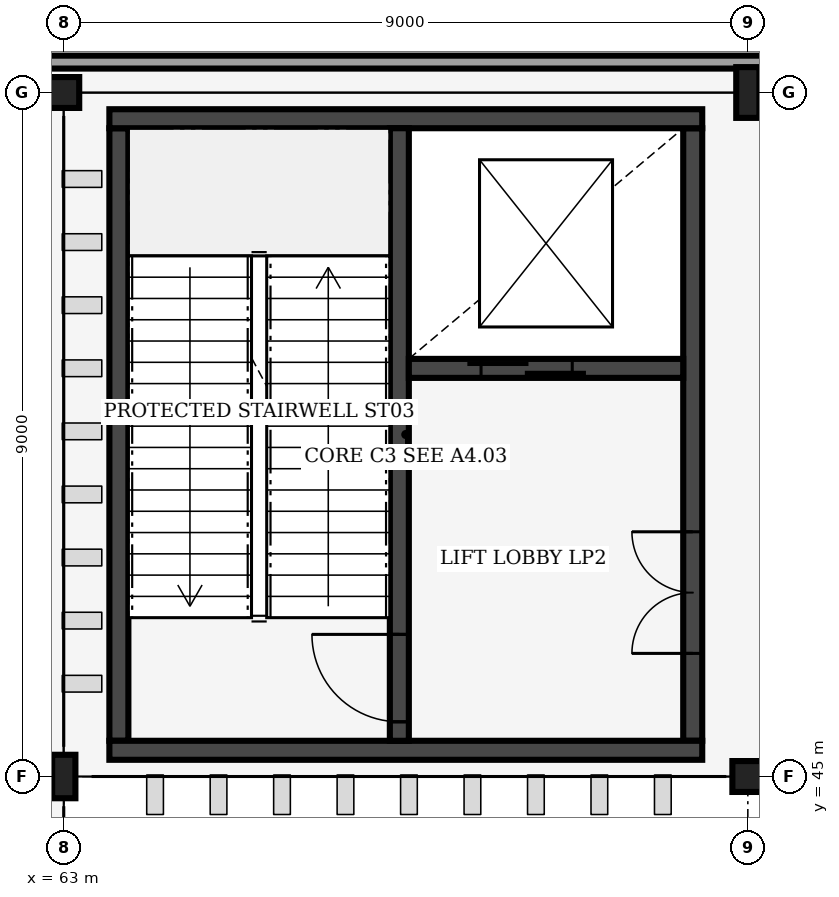
"""IFC4 building model, lengths in metres.
Left out: names, types, materials, properties, quantities, classifications, styles, units other than length and angle.
Written with IfcOpenShell. Run it as: python <this file> out.ifc"""

import sys

from ifc_helpers import new_model, si_unit, direction, frame, frame_2d, origin, origin_2d, place, context, subcontext, project, spatial, rectangle, hollow_circle, i_section, extrude, element, fill, save


model = new_model("IFC4")
c1 = context("Model", 3, precision=1e-05, world=origin(), true_north=direction((0.0, 1.0)))
c2 = subcontext(c1, "Body", "Model", "MODEL_VIEW")
j1 = project(units=[si_unit("LENGTHUNIT", "METRE"), si_unit("PLANEANGLEUNIT", "RADIAN")], contexts=[c1])
p1 = place(None, origin())
s1 = spatial("IfcSite", under=j1, at=p1, CompositionType="ELEMENT")
p2 = place(p1, origin())
s2 = spatial("IfcBuilding", under=s1, at=p2, CompositionType="ELEMENT")
p3 = place(p2, frame((0.0, 0.0, 12.0)))
s3 = spatial("IfcBuildingStorey", under=s2, at=p3, CompositionType="ELEMENT", Elevation=12.0)
p4 = place(p3, frame((63.0, 45.0, 0.0), z_axis=(0.0, 0.0, 1.0), x_axis=(1.0, 0.0, 0.0)))
e1 = element("IfcColumn", 1, at=p4, inside=s3, PredefinedType="COLUMN", context=c2, shape_type="SweptSolid", body=[
    extrude(i_section(OverallWidth=0.306, OverallDepth=0.572, WebThickness=0.021, FlangeThickness=0.04, FilletRadius=0.027, at=origin_2d()), origin(), (0.0, 0.0, 1.0), 6.0),
])
for number, where, z_axis, x_axis in (
    (2, (63.0, 54.0, 0.0), (0.0, 0.0, 1.0), (1.0, 0.0, 0.0)),
    (3, (72.0, 45.0, 0.0), (0.0, 0.0, 1.0), (1.0, 0.0, 0.0)),
):
    element("IfcColumn", number, at=place(p3, frame(where, z_axis=z_axis, x_axis=x_axis)), inside=s3, PredefinedType="COLUMN", context=c2, shape_type="SweptSolid", body=[
        extrude(hollow_circle(Radius=0.203, WallThickness=0.016, at=origin_2d()), origin(), (0.0, 0.0, 1.0), 6.0),
    ])
p5 = place(p3, frame((72.0, 54.0, 0.0), z_axis=(0.0, 0.0, 1.0), x_axis=(1.0, 0.0, 0.0)))
e4 = element("IfcColumn", 4, at=p5, inside=s3, PredefinedType="COLUMN", context=c2, shape_type="SweptSolid", body=[
    extrude(i_section(OverallWidth=0.305, OverallDepth=0.668, WebThickness=0.021, FlangeThickness=0.04, FilletRadius=0.027, at=origin_2d()), origin(), (0.0, 0.0, 1.0), 6.0),
])
p6 = place(p3, frame((63.725, 45.47, 0.0), z_axis=(0.0, 0.0, 1.0), x_axis=(0.0, 1.0, 0.0)))
e5 = element("IfcWall", 5, at=p6, inside=s3, PredefinedType="SHEAR", context=c2, shape_type="SweptSolid", body=[
    extrude(rectangle(XDim=8.06, YDim=0.25, at=frame_2d((4.03, 0.0))), origin(), (0.0, 0.0, 1.0), 5.7),
])
p7 = place(p3, frame((71.275, 45.47, 0.0), z_axis=(0.0, 0.0, 1.0), x_axis=(0.0, 1.0, 0.0)))
e6 = element("IfcWall", 6, at=p7, inside=s3, PredefinedType="SHEAR", context=c2, shape_type="SweptSolid", body=[
    extrude(rectangle(XDim=8.06, YDim=0.25, at=frame_2d((4.03, 0.0))), origin(), (0.0, 0.0, 1.0), 5.7),
])
p8 = place(p7, frame((1.15, 0.0, 0.0)))
e7 = element("IfcOpeningElement", 7, at=p8, cuts=e6, PredefinedType="OPENING", context=c2, shape_type="SweptSolid", body=[
    extrude(rectangle(XDim=1.6, YDim=2.2, at=frame_2d((0.8, 1.1))), frame((0.0, 0.135, 0.0), z_axis=(0.0, -1.0, 0.0), x_axis=(1.0, 0.0, 0.0)), (0.0, 0.0, 1.0), 0.27),
])
for number, where, z_axis, x_axis in (
    (8, (63.6, 45.345, 0.0), (0.0, 0.0, 1.0), (1.0, 0.0, 0.0)),
    (9, (63.6, 53.655, 0.0), (0.0, 0.0, 1.0), (1.0, 0.0, 0.0)),
):
    element("IfcWall", number, at=place(p3, frame(where, z_axis=z_axis, x_axis=x_axis)), inside=s3, PredefinedType="SHEAR", context=c2, shape_type="SweptSolid", body=[
        extrude(rectangle(XDim=7.8, YDim=0.25, at=frame_2d((3.9, 0.0))), origin(), (0.0, 0.0, 1.0), 5.7),
    ])
p9 = place(p3, frame((67.415, 45.47, 0.0), z_axis=(0.0, 0.0, 1.0), x_axis=(0.0, 1.0, 0.0)))
e10 = element("IfcWall", 10, at=p9, inside=s3, PredefinedType="SHEAR", context=c2, shape_type="SweptSolid", body=[
    extrude(rectangle(XDim=8.06, YDim=0.25, at=frame_2d((4.03, 0.0))), origin(), (0.0, 0.0, 1.0), 5.7),
])
p10 = place(p9, frame((0.25, 0.0, 0.0)))
e11 = element("IfcOpeningElement", 11, at=p10, cuts=e10, PredefinedType="OPENING", context=c2, shape_type="SweptSolid", body=[
    extrude(rectangle(XDim=1.15, YDim=2.15, at=frame_2d((0.575, 1.075))), frame((0.0, 0.135, 0.0), z_axis=(0.0, -1.0, 0.0), x_axis=(1.0, 0.0, 0.0)), (0.0, 0.0, 1.0), 0.27),
])
p11 = place(p3, frame((67.54, 50.37, 0.0), z_axis=(0.0, 0.0, 1.0), x_axis=(1.0, 0.0, 0.0)))
e12 = element("IfcWall", 12, at=p11, inside=s3, PredefinedType="SHEAR", context=c2, shape_type="SweptSolid", body=[
    extrude(rectangle(XDim=3.61, YDim=0.25, at=frame_2d((1.805, 0.0))), origin(), (0.0, 0.0, 1.0), 5.7),
])
p12 = place(p11, frame((0.95, 0.0, 0.0)))
e13 = element("IfcOpeningElement", 13, at=p12, cuts=e12, PredefinedType="OPENING", context=c2, shape_type="SweptSolid", body=[
    extrude(rectangle(XDim=1.2, YDim=2.2, at=frame_2d((0.6, 1.1))), frame((0.0, 0.135, 0.0), z_axis=(0.0, -1.0, 0.0), x_axis=(1.0, 0.0, 0.0)), (0.0, 0.0, 1.0), 0.27),
])
p13 = place(p3, frame((0.6, 54.4, 0.0), z_axis=(0.0, 0.0, 1.0), x_axis=(1.0, 0.0, 0.0)))
e14 = element("IfcWall", 14, at=p13, inside=s3, PredefinedType="PARTITIONING", context=c2, shape_type="SweptSolid", body=[
    extrude(rectangle(XDim=124.8, YDim=0.17, at=frame_2d((62.4, 0.0))), origin(), (0.0, 0.0, 1.0), 4.75),
])
p14 = place(p13, frame((0.85, 0.0, 0.0)))
e15 = element("IfcOpeningElement", 15, at=p14, cuts=e14, PredefinedType="OPENING", context=c2, shape_type="SweptSolid", body=[
    extrude(rectangle(XDim=1.02, YDim=2.15, at=frame_2d((0.51, 1.075))), frame((0.0, 0.095, 0.0), z_axis=(0.0, -1.0, 0.0), x_axis=(1.0, 0.0, 0.0)), (0.0, 0.0, 1.0), 0.19),
])
p15 = place(p10, origin())
e16 = element("IfcDoor", 16, at=p15, inside=s3, OperationType="SINGLE_SWING_RIGHT", PredefinedType="DOOR", context=c2, shape_type="SweptSolid", body=[
    extrude(rectangle(XDim=1.15, YDim=2.15, at=frame_2d((0.575, 1.075))), frame((0.0, 0.025, 0.0), z_axis=(0.0, -1.0, 0.0), x_axis=(1.0, 0.0, 0.0)), (0.0, 0.0, 1.0), 0.05),
])
fill(e11, e16)
p16 = place(p12, origin())
e17 = element("IfcDoor", 17, at=p16, inside=s3, OperationType="DOUBLE_DOOR_SLIDING", PredefinedType="DOOR", context=c2, shape_type="SweptSolid", body=[
    extrude(rectangle(XDim=1.2, YDim=2.2, at=frame_2d((0.6, 1.1))), frame((0.0, 0.025, 0.0), z_axis=(0.0, -1.0, 0.0), x_axis=(1.0, 0.0, 0.0)), (0.0, 0.0, 1.0), 0.05),
])
fill(e13, e17)
p17 = place(p8, origin())
e18 = element("IfcDoor", 18, at=p17, inside=s3, OperationType="DOUBLE_DOOR_SINGLE_SWING", PredefinedType="DOOR", context=c2, shape_type="SweptSolid", body=[
    extrude(rectangle(XDim=1.6, YDim=2.2, at=frame_2d((0.8, 1.1))), frame((0.0, 0.025, 0.0), z_axis=(0.0, -1.0, 0.0), x_axis=(1.0, 0.0, 0.0)), (0.0, 0.0, 1.0), 0.05),
])
fill(e7, e18)
save(model, sys.argv[1])
